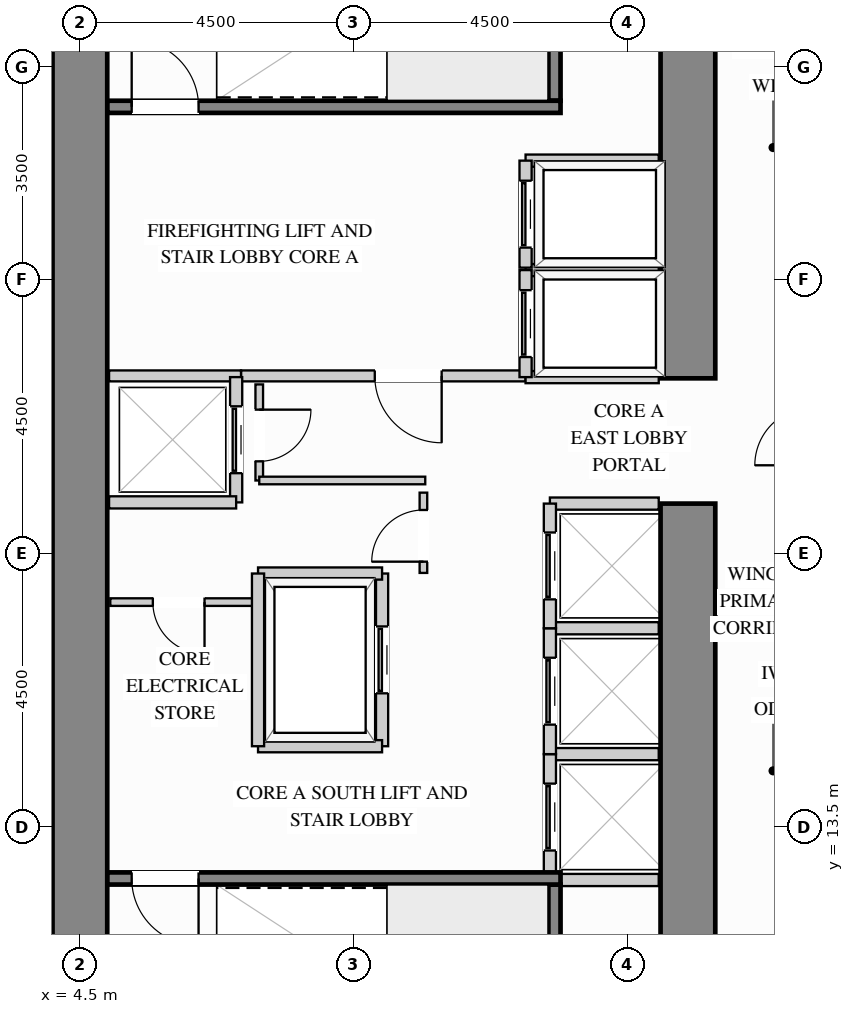
"""IFC4 building model, lengths in metres.
Left out: names, types, materials, properties, quantities, classifications, styles, units other than length and angle.
Written with IfcOpenShell. Run it as: python <this file> out.ifc"""

import sys

from ifc_helpers import new_model, si_unit, direction, frame, frame_2d, origin, place, context, subcontext, project, spatial, rectangle, extrude, source, transform, mapped, element, fill, save


model = new_model("IFC4")
c1 = context("Model", 3, precision=1e-05, world=origin(), true_north=direction((0.0, 1.0)))
c2 = subcontext(c1, "Body", "Model", "MODEL_VIEW")
j1 = project(units=[si_unit("LENGTHUNIT", "METRE"), si_unit("PLANEANGLEUNIT", "RADIAN")], contexts=[c1])
p1 = place(None, origin())
s1 = spatial("IfcSite", under=j1, at=p1, CompositionType="ELEMENT")
p2 = place(p1, origin())
s2 = spatial("IfcBuilding", under=s1, at=p2, CompositionType="ELEMENT")
p3 = place(p2, frame((0.0, 0.0, 44.1)))
s3 = spatial("IfcBuildingStorey", under=s2, at=p3, CompositionType="ELEMENT", Elevation=44.1)
m1 = source(origin(), c2, "Body", "SweptSolid", [
    extrude(rectangle(XDim=9.87, YDim=0.9, at=frame_2d((4.935, 0.0))), origin(), (0.0, 0.0, 1.0), 3.38),
])
p4 = place(p3, frame((14.5, 8.95, 0.0), z_axis=(0.0, 0.0, 1.0), x_axis=(0.0, 1.0, 0.0)))
e1 = element("IfcWall", 1, at=p4, inside=s3, PredefinedType="SHEAR", context=c2, shape_type="MappedRepresentation", body=[
    mapped(m1, transform((0.0, 0.0, 0.0), x_axis=(1.0, 0.0, 0.0), y_axis=(0.0, 1.0, 0.0), z_axis=(0.0, 0.0, 1.0))),
])
m2 = source(origin(), c2, "Body", "SweptSolid", [
    extrude(rectangle(XDim=8.17, YDim=0.9, at=frame_2d((4.085, 0.0))), origin(), (0.0, 0.0, 1.0), 3.38),
])
p5 = place(p3, frame((14.5, 20.88, 0.0), z_axis=(0.0, 0.0, 1.0), x_axis=(0.0, 1.0, 0.0)))
e2 = element("IfcWall", 2, at=p5, inside=s3, PredefinedType="SHEAR", context=c2, shape_type="MappedRepresentation", body=[
    mapped(m2, transform((0.0, 0.0, 0.0), x_axis=(1.0, 0.0, 0.0), y_axis=(0.0, 1.0, 0.0), z_axis=(0.0, 0.0, 1.0))),
])
m3 = source(origin(), c2, "Body", "SweptSolid", [
    extrude(rectangle(XDim=20.1, YDim=0.9, at=frame_2d((10.05, 0.0))), origin(), (0.0, 0.0, 1.0), 3.38),
])
p6 = place(p3, frame((4.5, 8.95, 0.0), z_axis=(0.0, 0.0, 1.0), x_axis=(0.0, 1.0, 0.0)))
e3 = element("IfcWall", 3, at=p6, inside=s3, PredefinedType="SHEAR", context=c2, shape_type="MappedRepresentation", body=[
    mapped(m3, transform((0.0, 0.0, 0.0), x_axis=(1.0, 0.0, 0.0), y_axis=(0.0, 1.0, 0.0), z_axis=(0.0, 0.0, 1.0))),
])
p7 = place(p3, frame((7.15, 20.92, 0.0), z_axis=(0.0, 0.0, 1.0), x_axis=(1.0, 0.0, 0.0)))
e4 = element("IfcWall", 4, at=p7, inside=s3, PredefinedType="PARTITIONING", context=c2, shape_type="SweptSolid", body=[
    extrude(rectangle(XDim=4.68, YDim=0.18, at=frame_2d((2.34, 0.0))), origin(), (0.0, 0.0, 1.0), 3.365),
])
p8 = place(p7, frame((2.2, 0.0, 0.0)))
e5 = element("IfcOpeningElement", 5, at=p8, cuts=e4, PredefinedType="OPENING", context=c2, shape_type="SweptSolid", body=[
    extrude(rectangle(XDim=1.1, YDim=2.15, at=frame_2d((0.55, 1.075))), frame((0.0, 0.1, 0.0), z_axis=(0.0, -1.0, 0.0), x_axis=(1.0, 0.0, 0.0)), (0.0, 0.0, 1.0), 0.2),
])
m4 = source(origin(), c2, "Body", "SweptSolid", [
    extrude(rectangle(XDim=2.17, YDim=0.18, at=frame_2d((1.085, 0.0))), origin(), (0.0, 0.0, 1.0), 3.365),
])
p9 = place(p3, frame((4.98, 20.92, 0.0), z_axis=(0.0, 0.0, 1.0), x_axis=(1.0, 0.0, 0.0)))
e6 = element("IfcWall", 6, at=p9, inside=s3, PredefinedType="PARTITIONING", context=c2, shape_type="MappedRepresentation", body=[
    mapped(m4, transform((0.0, 0.0, 0.0), x_axis=(1.0, 0.0, 0.0), y_axis=(0.0, 1.0, 0.0), z_axis=(0.0, 0.0, 1.0))),
])
p10 = place(p3, frame((10.15, 17.68, 0.0), z_axis=(0.0, 0.0, 1.0), x_axis=(0.0, 1.0, 0.0)))
e7 = element("IfcWall", 7, at=p10, inside=s3, PredefinedType="PARTITIONING", context=c2, shape_type="SweptSolid", body=[
    extrude(rectangle(XDim=1.32, YDim=0.125, at=frame_2d((0.66, 0.0))), origin(), (0.0, 0.0, 1.0), 3.365),
])
p11 = place(p10, frame((0.185, 0.0, 0.0)))
e8 = element("IfcOpeningElement", 8, at=p11, cuts=e7, PredefinedType="OPENING", context=c2, shape_type="SweptSolid", body=[
    extrude(rectangle(XDim=0.85, YDim=2.1, at=frame_2d((0.425, 1.05))), frame((0.0, 0.073, 0.0), z_axis=(0.0, -1.0, 0.0), x_axis=(1.0, 0.0, 0.0)), (0.0, 0.0, 1.0), 0.145),
])
p12 = place(p3, frame((7.45, 19.2, 0.0), z_axis=(0.0, 0.0, 1.0), x_axis=(0.0, 1.0, 0.0)))
e9 = element("IfcWall", 9, at=p12, inside=s3, PredefinedType="PARTITIONING", context=c2, shape_type="SweptSolid", body=[
    extrude(rectangle(XDim=1.58, YDim=0.125, at=frame_2d((0.79, 0.0))), origin(), (0.0, 0.0, 1.0), 3.365),
])
p13 = place(p12, frame((0.315, 0.0, 0.0)))
e10 = element("IfcOpeningElement", 10, at=p13, cuts=e9, PredefinedType="OPENING", context=c2, shape_type="SweptSolid", body=[
    extrude(rectangle(XDim=0.85, YDim=2.1, at=frame_2d((0.425, 1.05))), frame((0.0, 0.073, 0.0), z_axis=(0.0, -1.0, 0.0), x_axis=(1.0, 0.0, 0.0)), (0.0, 0.0, 1.0), 0.145),
])
m5 = source(origin(), c2, "Body", "SweptSolid", [
    extrude(rectangle(XDim=2.73, YDim=0.125, at=frame_2d((1.365, 0.0))), origin(), (0.0, 0.0, 1.0), 3.365),
])
p14 = place(p3, frame((7.45, 19.2, 0.0), z_axis=(0.0, 0.0, 1.0), x_axis=(1.0, 0.0, 0.0)))
e11 = element("IfcWall", 11, at=p14, inside=s3, PredefinedType="PARTITIONING", context=c2, shape_type="MappedRepresentation", body=[
    mapped(m5, transform((0.0, 0.0, 0.0), x_axis=(1.0, 0.0, 0.0), y_axis=(0.0, 1.0, 0.0), z_axis=(0.0, 0.0, 1.0))),
])
p15 = place(p3, frame((5.0, 17.2, 0.0), z_axis=(0.0, 0.0, 1.0), x_axis=(1.0, 0.0, 0.0)))
e12 = element("IfcWall", 12, at=p15, inside=s3, PredefinedType="PARTITIONING", context=c2, shape_type="SweptSolid", body=[
    extrude(rectangle(XDim=2.4, YDim=0.125, at=frame_2d((1.2, 0.0))), origin(), (0.0, 0.0, 1.0), 3.365),
])
p16 = place(p15, frame((0.7, 0.0, 0.0)))
e13 = element("IfcOpeningElement", 13, at=p16, cuts=e12, PredefinedType="OPENING", context=c2, shape_type="SweptSolid", body=[
    extrude(rectangle(XDim=0.85, YDim=2.1, at=frame_2d((0.425, 1.05))), frame((0.0, 0.073, 0.0), z_axis=(0.0, -1.0, 0.0), x_axis=(1.0, 0.0, 0.0)), (0.0, 0.0, 1.0), 0.145),
])
m6 = source(origin(), c2, "Body", "SweptSolid", [
    extrude(rectangle(XDim=2.19, YDim=0.2, at=frame_2d((1.095, 0.0))), origin(), (0.0, 0.0, 1.0), 3.365),
])
for number, where, z_axis, x_axis in (
    (14, (11.83, 22.66, 0.0), (0.0, 0.0, 1.0), (1.0, 0.0, 0.0)),
    (15, (11.83, 20.9, 0.0), (0.0, 0.0, 1.0), (1.0, 0.0, 0.0)),
):
    element("IfcWall", number, at=place(p3, frame(where, z_axis=z_axis, x_axis=x_axis)), inside=s3, PredefinedType="PARTITIONING", context=c2, shape_type="MappedRepresentation", body=[
        mapped(m6, transform((0.0, 0.0, 0.0), x_axis=(1.0, 0.0, 0.0), y_axis=(0.0, 1.0, 0.0), z_axis=(0.0, 0.0, 1.0))),
    ])
p17 = place(p3, frame((11.83, 20.9, 0.0), z_axis=(0.0, 0.0, 1.0), x_axis=(0.0, 1.0, 0.0)))
e16 = element("IfcWall", 16, at=p17, inside=s3, PredefinedType="PARTITIONING", context=c2, shape_type="SweptSolid", body=[
    extrude(rectangle(XDim=1.76, YDim=0.2, at=frame_2d((0.88, 0.0))), origin(), (0.0, 0.0, 1.0), 3.365),
])
p18 = place(p17, frame((0.33, 0.0, 0.0)))
e17 = element("IfcOpeningElement", 17, at=p18, cuts=e16, PredefinedType="OPENING", context=c2, shape_type="SweptSolid", body=[
    extrude(rectangle(XDim=1.1, YDim=2.2, at=frame_2d((0.55, 1.1))), frame((0.0, 0.11, 0.0), z_axis=(0.0, -1.0, 0.0), x_axis=(1.0, 0.0, 0.0)), (0.0, 0.0, 1.0), 0.22),
])
p19 = place(p3, frame((11.83, 24.46, 0.0), z_axis=(0.0, 0.0, 1.0), x_axis=(1.0, 0.0, 0.0)))
e18 = element("IfcWall", 18, at=p19, inside=s3, PredefinedType="PARTITIONING", context=c2, shape_type="MappedRepresentation", body=[
    mapped(m6, transform((0.0, 0.0, 0.0), x_axis=(1.0, 0.0, 0.0), y_axis=(0.0, 1.0, 0.0), z_axis=(0.0, 0.0, 1.0))),
])
p20 = place(p3, frame((11.83, 22.7, 0.0), z_axis=(0.0, 0.0, 1.0), x_axis=(0.0, 1.0, 0.0)))
e19 = element("IfcWall", 19, at=p20, inside=s3, PredefinedType="PARTITIONING", context=c2, shape_type="SweptSolid", body=[
    extrude(rectangle(XDim=1.76, YDim=0.2, at=frame_2d((0.88, 0.0))), origin(), (0.0, 0.0, 1.0), 3.365),
])
p21 = place(p20, frame((0.33, 0.0, 0.0)))
e20 = element("IfcOpeningElement", 20, at=p21, cuts=e19, PredefinedType="OPENING", context=c2, shape_type="SweptSolid", body=[
    extrude(rectangle(XDim=1.1, YDim=2.2, at=frame_2d((0.55, 1.1))), frame((0.0, 0.11, 0.0), z_axis=(0.0, -1.0, 0.0), x_axis=(1.0, 0.0, 0.0)), (0.0, 0.0, 1.0), 0.22),
])
m7 = source(origin(), c2, "Body", "SweptSolid", [
    extrude(rectangle(XDim=1.79, YDim=0.2, at=frame_2d((0.895, 0.0))), origin(), (0.0, 0.0, 1.0), 3.365),
])
for number, where, z_axis, x_axis in (
    (21, (12.23, 14.7, 0.0), (0.0, 0.0, 1.0), (1.0, 0.0, 0.0)),
    (22, (12.23, 12.63, 0.0), (0.0, 0.0, 1.0), (1.0, 0.0, 0.0)),
):
    element("IfcWall", number, at=place(p3, frame(where, z_axis=z_axis, x_axis=x_axis)), inside=s3, PredefinedType="PARTITIONING", context=c2, shape_type="MappedRepresentation", body=[
        mapped(m7, transform((0.0, 0.0, 0.0), x_axis=(1.0, 0.0, 0.0), y_axis=(0.0, 1.0, 0.0), z_axis=(0.0, 0.0, 1.0))),
    ])
p22 = place(p3, frame((12.23, 12.63, 0.0), z_axis=(0.0, 0.0, 1.0), x_axis=(0.0, 1.0, 0.0)))
e23 = element("IfcWall", 23, at=p22, inside=s3, PredefinedType="PARTITIONING", context=c2, shape_type="SweptSolid", body=[
    extrude(rectangle(XDim=2.07, YDim=0.2, at=frame_2d((1.035, 0.0))), origin(), (0.0, 0.0, 1.0), 3.365),
])
p23 = place(p22, frame((0.485, 0.0, 0.0)))
e24 = element("IfcOpeningElement", 24, at=p23, cuts=e23, PredefinedType="OPENING", context=c2, shape_type="SweptSolid", body=[
    extrude(rectangle(XDim=1.1, YDim=2.2, at=frame_2d((0.55, 1.1))), frame((0.0, 0.11, 0.0), z_axis=(0.0, -1.0, 0.0), x_axis=(1.0, 0.0, 0.0)), (0.0, 0.0, 1.0), 0.22),
])
p24 = place(p3, frame((12.23, 16.77, 0.0), z_axis=(0.0, 0.0, 1.0), x_axis=(1.0, 0.0, 0.0)))
e25 = element("IfcWall", 25, at=p24, inside=s3, PredefinedType="PARTITIONING", context=c2, shape_type="MappedRepresentation", body=[
    mapped(m7, transform((0.0, 0.0, 0.0), x_axis=(1.0, 0.0, 0.0), y_axis=(0.0, 1.0, 0.0), z_axis=(0.0, 0.0, 1.0))),
])
p25 = place(p3, frame((12.23, 14.7, 0.0), z_axis=(0.0, 0.0, 1.0), x_axis=(0.0, 1.0, 0.0)))
e26 = element("IfcWall", 26, at=p25, inside=s3, PredefinedType="PARTITIONING", context=c2, shape_type="SweptSolid", body=[
    extrude(rectangle(XDim=2.07, YDim=0.2, at=frame_2d((1.035, 0.0))), origin(), (0.0, 0.0, 1.0), 3.365),
])
p26 = place(p25, frame((0.485, 0.0, 0.0)))
e27 = element("IfcOpeningElement", 27, at=p26, cuts=e26, PredefinedType="OPENING", context=c2, shape_type="SweptSolid", body=[
    extrude(rectangle(XDim=1.1, YDim=2.2, at=frame_2d((0.55, 1.1))), frame((0.0, 0.11, 0.0), z_axis=(0.0, -1.0, 0.0), x_axis=(1.0, 0.0, 0.0)), (0.0, 0.0, 1.0), 0.22),
])
p27 = place(p3, frame((12.23, 18.82, 0.0), z_axis=(0.0, 0.0, 1.0), x_axis=(1.0, 0.0, 0.0)))
e28 = element("IfcWall", 28, at=p27, inside=s3, PredefinedType="PARTITIONING", context=c2, shape_type="MappedRepresentation", body=[
    mapped(m7, transform((0.0, 0.0, 0.0), x_axis=(1.0, 0.0, 0.0), y_axis=(0.0, 1.0, 0.0), z_axis=(0.0, 0.0, 1.0))),
])
p28 = place(p3, frame((12.23, 16.77, 0.0), z_axis=(0.0, 0.0, 1.0), x_axis=(0.0, 1.0, 0.0)))
e29 = element("IfcWall", 29, at=p28, inside=s3, PredefinedType="PARTITIONING", context=c2, shape_type="SweptSolid", body=[
    extrude(rectangle(XDim=2.05, YDim=0.2, at=frame_2d((1.025, 0.0))), origin(), (0.0, 0.0, 1.0), 3.365),
])
p29 = place(p28, frame((0.475, 0.0, 0.0)))
e30 = element("IfcOpeningElement", 30, at=p29, cuts=e29, PredefinedType="OPENING", context=c2, shape_type="SweptSolid", body=[
    extrude(rectangle(XDim=1.1, YDim=2.2, at=frame_2d((0.55, 1.1))), frame((0.0, 0.11, 0.0), z_axis=(0.0, -1.0, 0.0), x_axis=(1.0, 0.0, 0.0)), (0.0, 0.0, 1.0), 0.22),
])
p30 = place(p3, frame((7.07, 18.84, 0.0), z_axis=(0.0, 0.0, 1.0), x_axis=(0.0, 1.0, 0.0)))
e31 = element("IfcWall", 31, at=p30, inside=s3, PredefinedType="PARTITIONING", context=c2, shape_type="SweptSolid", body=[
    extrude(rectangle(XDim=2.06, YDim=0.2, at=frame_2d((1.03, 0.0))), origin(), (0.0, 0.0, 1.0), 3.365),
])
p31 = place(p30, frame((0.48, 0.0, 0.0)))
e32 = element("IfcOpeningElement", 32, at=p31, cuts=e31, PredefinedType="OPENING", context=c2, shape_type="SweptSolid", body=[
    extrude(rectangle(XDim=1.1, YDim=2.2, at=frame_2d((0.55, 1.1))), frame((0.0, 0.11, 0.0), z_axis=(0.0, -1.0, 0.0), x_axis=(1.0, 0.0, 0.0)), (0.0, 0.0, 1.0), 0.22),
])
m8 = source(origin(), c2, "Body", "SweptSolid", [
    extrude(rectangle(XDim=2.09, YDim=0.2, at=frame_2d((1.045, 0.0))), origin(), (0.0, 0.0, 1.0), 3.365),
])
p32 = place(p3, frame((4.98, 18.84, 0.0), z_axis=(0.0, 0.0, 1.0), x_axis=(1.0, 0.0, 0.0)))
e33 = element("IfcWall", 33, at=p32, inside=s3, PredefinedType="PARTITIONING", context=c2, shape_type="MappedRepresentation", body=[
    mapped(m8, transform((0.0, 0.0, 0.0), x_axis=(1.0, 0.0, 0.0), y_axis=(0.0, 1.0, 0.0), z_axis=(0.0, 0.0, 1.0))),
])
p33 = place(p3, frame((9.47, 14.83, 0.0), z_axis=(0.0, 0.0, 1.0), x_axis=(0.0, 1.0, 0.0)))
e34 = element("IfcWall", 34, at=p33, inside=s3, PredefinedType="PARTITIONING", context=c2, shape_type="SweptSolid", body=[
    extrude(rectangle(XDim=2.84, YDim=0.2, at=frame_2d((1.42, 0.0))), origin(), (0.0, 0.0, 1.0), 3.365),
])
p34 = place(p33, frame((0.87, 0.0, 0.0)))
e35 = element("IfcOpeningElement", 35, at=p34, cuts=e34, PredefinedType="OPENING", context=c2, shape_type="SweptSolid", body=[
    extrude(rectangle(XDim=1.1, YDim=2.2, at=frame_2d((0.55, 1.1))), frame((0.0, 0.11, 0.0), z_axis=(0.0, -1.0, 0.0), x_axis=(1.0, 0.0, 0.0)), (0.0, 0.0, 1.0), 0.22),
])
m9 = source(origin(), c2, "Body", "SweptSolid", [
    extrude(rectangle(XDim=2.04, YDim=0.2, at=frame_2d((1.02, 0.0))), origin(), (0.0, 0.0, 1.0), 3.365),
])
for number, where, z_axis, x_axis in (
    (36, (7.43, 17.67, 0.0), (0.0, 0.0, 1.0), (1.0, 0.0, 0.0)),
    (37, (7.43, 14.83, 0.0), (0.0, 0.0, 1.0), (1.0, 0.0, 0.0)),
):
    element("IfcWall", number, at=place(p3, frame(where, z_axis=z_axis, x_axis=x_axis)), inside=s3, PredefinedType="PARTITIONING", context=c2, shape_type="MappedRepresentation", body=[
        mapped(m9, transform((0.0, 0.0, 0.0), x_axis=(1.0, 0.0, 0.0), y_axis=(0.0, 1.0, 0.0), z_axis=(0.0, 0.0, 1.0))),
    ])
m10 = source(origin(), c2, "Body", "SweptSolid", [
    extrude(rectangle(XDim=2.84, YDim=0.2, at=frame_2d((1.42, 0.0))), origin(), (0.0, 0.0, 1.0), 3.365),
])
p35 = place(p3, frame((7.43, 14.83, 0.0), z_axis=(0.0, 0.0, 1.0), x_axis=(0.0, 1.0, 0.0)))
e38 = element("IfcWall", 38, at=p35, inside=s3, PredefinedType="PARTITIONING", context=c2, shape_type="MappedRepresentation", body=[
    mapped(m10, transform((0.0, 0.0, 0.0), x_axis=(1.0, 0.0, 0.0), y_axis=(0.0, 1.0, 0.0), z_axis=(0.0, 0.0, 1.0))),
])
m11 = source(origin(), c2, "Body", "SweptSolid", [
    extrude(rectangle(XDim=3.603, YDim=0.2, at=frame_2d((1.802, 0.0))), origin(), (0.0, 0.0, 1.0), 3.38),
])
p36 = place(p3, frame((12.305, 8.952, 0.0), z_axis=(0.0, 0.0, 1.0), x_axis=(0.0, 1.0, 0.0)))
e39 = element("IfcWall", 39, at=p36, inside=s3, PredefinedType="SHEAR", context=c2, shape_type="MappedRepresentation", body=[
    mapped(m11, transform((0.0, 0.0, 0.0), x_axis=(1.0, 0.0, 0.0), y_axis=(0.0, 1.0, 0.0), z_axis=(0.0, 0.0, 1.0))),
])
p37 = place(p3, frame((4.952, 12.655, 0.0), z_axis=(0.0, 0.0, 1.0), x_axis=(1.0, 0.0, 0.0)))
e40 = element("IfcWall", 40, at=p37, inside=s3, PredefinedType="SHEAR", context=c2, shape_type="SweptSolid", body=[
    extrude(rectangle(XDim=7.453, YDim=0.2, at=frame_2d((3.727, 0.0))), origin(), (0.0, 0.0, 1.0), 3.38),
])
p38 = place(p37, frame((0.4, 0.0, 0.0)))
e41 = element("IfcOpeningElement", 41, at=p38, cuts=e40, PredefinedType="OPENING", context=c2, shape_type="SweptSolid", body=[
    extrude(rectangle(XDim=1.1, YDim=2.15, at=frame_2d((0.55, 1.075))), frame((0.0, 0.11, 0.0), z_axis=(0.0, -1.0, 0.0), x_axis=(1.0, 0.0, 0.0)), (0.0, 0.0, 1.0), 0.22),
])
p39 = place(p3, frame((12.305, 25.445, 0.0), z_axis=(0.0, 0.0, 1.0), x_axis=(0.0, 1.0, 0.0)))
e42 = element("IfcWall", 42, at=p39, inside=s3, PredefinedType="SHEAR", context=c2, shape_type="MappedRepresentation", body=[
    mapped(m11, transform((0.0, 0.0, 0.0), x_axis=(1.0, 0.0, 0.0), y_axis=(0.0, 1.0, 0.0), z_axis=(0.0, 0.0, 1.0))),
])
p40 = place(p3, frame((4.952, 25.345, 0.0), z_axis=(0.0, 0.0, 1.0), x_axis=(1.0, 0.0, 0.0)))
e43 = element("IfcWall", 43, at=p40, inside=s3, PredefinedType="SHEAR", context=c2, shape_type="SweptSolid", body=[
    extrude(rectangle(XDim=7.453, YDim=0.2, at=frame_2d((3.727, 0.0))), origin(), (0.0, 0.0, 1.0), 3.38),
])
p41 = place(p40, frame((0.4, 0.0, 0.0)))
e44 = element("IfcOpeningElement", 44, at=p41, cuts=e43, PredefinedType="OPENING", context=c2, shape_type="SweptSolid", body=[
    extrude(rectangle(XDim=1.1, YDim=2.15, at=frame_2d((0.55, 1.075))), frame((0.0, 0.11, 0.0), z_axis=(0.0, -1.0, 0.0), x_axis=(1.0, 0.0, 0.0)), (0.0, 0.0, 1.0), 0.22),
])
m12 = source(origin(), c2, "Body", "SweptSolid", [
    extrude(rectangle(XDim=1.1, YDim=2.15, at=frame_2d((0.55, 1.075))), frame((0.0, 0.025, 0.0), z_axis=(0.0, -1.0, 0.0), x_axis=(1.0, 0.0, 0.0)), (0.0, 0.0, 1.0), 0.05),
])
p42 = place(p8, origin())
e45 = element("IfcDoor", 45, at=p42, inside=s3, OperationType="SINGLE_SWING_RIGHT", PredefinedType="DOOR", context=c2, shape_type="MappedRepresentation", body=[
    mapped(m12, transform((0.0, 0.0, 0.0), x_axis=(1.0, 0.0, 0.0), y_axis=(0.0, 1.0, 0.0), z_axis=(0.0, 0.0, 1.0))),
])
fill(e5, e45)
m13 = source(origin(), c2, "Body", "SweptSolid", [
    extrude(rectangle(XDim=1.1, YDim=2.2, at=frame_2d((0.55, 1.1))), frame((0.0, 0.025, 0.0), z_axis=(0.0, -1.0, 0.0), x_axis=(1.0, 0.0, 0.0)), (0.0, 0.0, 1.0), 0.05),
])
p43 = place(p18, origin())
e46 = element("IfcDoor", 46, at=p43, inside=s3, OperationType="SLIDING_TO_LEFT", PredefinedType="DOOR", context=c2, shape_type="MappedRepresentation", body=[
    mapped(m13, transform((0.0, 0.0, 0.0), x_axis=(1.0, 0.0, 0.0), y_axis=(0.0, 1.0, 0.0), z_axis=(0.0, 0.0, 1.0))),
])
fill(e17, e46)
p44 = place(p21, origin())
e47 = element("IfcDoor", 47, at=p44, inside=s3, OperationType="SLIDING_TO_LEFT", PredefinedType="DOOR", context=c2, shape_type="MappedRepresentation", body=[
    mapped(m13, transform((0.0, 0.0, 0.0), x_axis=(1.0, 0.0, 0.0), y_axis=(0.0, 1.0, 0.0), z_axis=(0.0, 0.0, 1.0))),
])
fill(e20, e47)
p45 = place(p23, origin())
e48 = element("IfcDoor", 48, at=p45, inside=s3, OperationType="SLIDING_TO_LEFT", PredefinedType="DOOR", context=c2, shape_type="MappedRepresentation", body=[
    mapped(m13, transform((0.0, 0.0, 0.0), x_axis=(1.0, 0.0, 0.0), y_axis=(0.0, 1.0, 0.0), z_axis=(0.0, 0.0, 1.0))),
])
fill(e24, e48)
p46 = place(p26, origin())
e49 = element("IfcDoor", 49, at=p46, inside=s3, OperationType="SLIDING_TO_LEFT", PredefinedType="DOOR", context=c2, shape_type="MappedRepresentation", body=[
    mapped(m13, transform((0.0, 0.0, 0.0), x_axis=(1.0, 0.0, 0.0), y_axis=(0.0, 1.0, 0.0), z_axis=(0.0, 0.0, 1.0))),
])
fill(e27, e49)
p47 = place(p29, origin())
e50 = element("IfcDoor", 50, at=p47, inside=s3, OperationType="SLIDING_TO_LEFT", PredefinedType="DOOR", context=c2, shape_type="MappedRepresentation", body=[
    mapped(m13, transform((0.0, 0.0, 0.0), x_axis=(1.0, 0.0, 0.0), y_axis=(0.0, 1.0, 0.0), z_axis=(0.0, 0.0, 1.0))),
])
fill(e30, e50)
p48 = place(p31, origin())
e51 = element("IfcDoor", 51, at=p48, inside=s3, OperationType="SLIDING_TO_LEFT", PredefinedType="DOOR", context=c2, shape_type="MappedRepresentation", body=[
    mapped(m13, transform((0.0, 0.0, 0.0), x_axis=(1.0, 0.0, 0.0), y_axis=(0.0, 1.0, 0.0), z_axis=(0.0, 0.0, 1.0))),
])
fill(e32, e51)
p49 = place(p34, origin())
e52 = element("IfcDoor", 52, at=p49, inside=s3, OperationType="SLIDING_TO_LEFT", PredefinedType="DOOR", context=c2, shape_type="MappedRepresentation", body=[
    mapped(m13, transform((0.0, 0.0, 0.0), x_axis=(1.0, 0.0, 0.0), y_axis=(0.0, 1.0, 0.0), z_axis=(0.0, 0.0, 1.0))),
])
fill(e35, e52)
m14 = source(origin(), c2, "Body", "SweptSolid", [
    extrude(rectangle(XDim=0.85, YDim=2.1, at=frame_2d((0.425, 1.05))), frame((0.0, 0.025, 0.0), z_axis=(0.0, -1.0, 0.0), x_axis=(1.0, 0.0, 0.0)), (0.0, 0.0, 1.0), 0.05),
])
p50 = place(p11, origin())
e53 = element("IfcDoor", 53, at=p50, inside=s3, OperationType="SINGLE_SWING_LEFT", PredefinedType="DOOR", context=c2, shape_type="MappedRepresentation", body=[
    mapped(m14, transform((0.0, 0.0, 0.0), x_axis=(1.0, 0.0, 0.0), y_axis=(0.0, 1.0, 0.0), z_axis=(0.0, 0.0, 1.0))),
])
fill(e8, e53)
p51 = place(p16, origin())
e54 = element("IfcDoor", 54, at=p51, inside=s3, OperationType="SINGLE_SWING_RIGHT", PredefinedType="DOOR", context=c2, shape_type="MappedRepresentation", body=[
    mapped(m14, transform((0.0, 0.0, 0.0), x_axis=(1.0, 0.0, 0.0), y_axis=(0.0, 1.0, 0.0), z_axis=(0.0, 0.0, 1.0))),
])
fill(e13, e54)
p52 = place(p13, origin())
e55 = element("IfcDoor", 55, at=p52, inside=s3, OperationType="SINGLE_SWING_RIGHT", PredefinedType="DOOR", context=c2, shape_type="MappedRepresentation", body=[
    mapped(m14, transform((0.0, 0.0, 0.0), x_axis=(1.0, 0.0, 0.0), y_axis=(0.0, 1.0, 0.0), z_axis=(0.0, 0.0, 1.0))),
])
fill(e10, e55)
m15 = source(origin(), c2, "Body", "SweptSolid", [
    extrude(rectangle(XDim=1.1, YDim=2.15, at=frame_2d((0.55, 1.075))), frame((0.0, 0.025, 0.0), z_axis=(0.0, -1.0, 0.0), x_axis=(1.0, 0.0, 0.0)), (0.0, 0.0, 1.0), 0.05),
])
p53 = place(p38, origin())
e56 = element("IfcDoor", 56, at=p53, inside=s3, OperationType="SINGLE_SWING_RIGHT", PredefinedType="DOOR", context=c2, shape_type="MappedRepresentation", body=[
    mapped(m15, transform((0.0, 0.0, 0.0), x_axis=(1.0, 0.0, 0.0), y_axis=(0.0, 1.0, 0.0), z_axis=(0.0, 0.0, 1.0))),
])
fill(e41, e56)
p54 = place(p41, origin())
e57 = element("IfcDoor", 57, at=p54, inside=s3, OperationType="SINGLE_SWING_LEFT", PredefinedType="DOOR", context=c2, shape_type="MappedRepresentation", body=[
    mapped(m15, transform((0.0, 0.0, 0.0), x_axis=(1.0, 0.0, 0.0), y_axis=(0.0, 1.0, 0.0), z_axis=(0.0, 0.0, 1.0))),
])
fill(e44, e57)
save(model, sys.argv[1])
